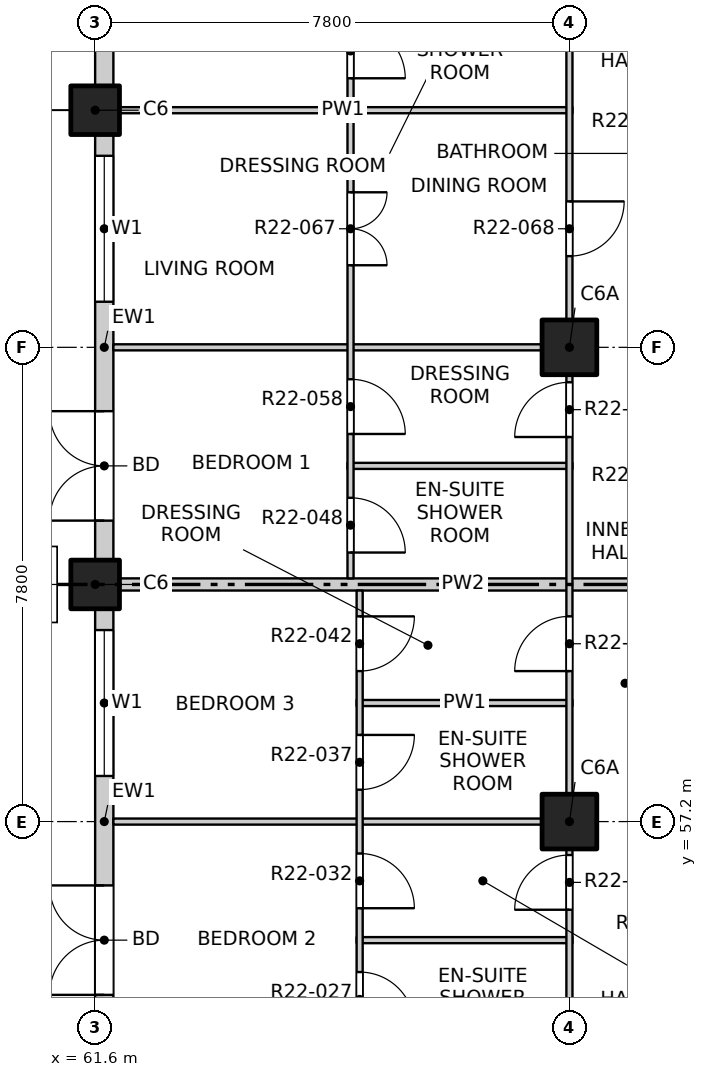
"""IFC4 building model, lengths in metres.
Left out: names, types, materials, properties, quantities, classifications, styles, units other than length and angle.
Written with IfcOpenShell. Run it as: python <this file> out.ifc"""

import sys

from ifc_helpers import new_model, si_unit, direction, frame, frame_2d, origin, origin_2d, place, context, subcontext, project, spatial, rectangle, extrude, element, fill, save


model = new_model("IFC4")
c1 = context("Model", 3, precision=1e-05, world=origin(), true_north=direction((0.0, 1.0)))
c2 = subcontext(c1, "Body", "Model", "MODEL_VIEW")
j1 = project(units=[si_unit("LENGTHUNIT", "METRE"), si_unit("PLANEANGLEUNIT", "RADIAN")], contexts=[c1])
p1 = place(None, origin())
s1 = spatial("IfcSite", under=j1, at=p1, CompositionType="ELEMENT")
p2 = place(p1, origin())
s2 = spatial("IfcBuilding", under=s1, at=p2, CompositionType="ELEMENT")
p3 = place(p2, frame((0.0, 0.0, 231.3)))
s3 = spatial("IfcBuildingStorey", under=s2, at=p3, CompositionType="ELEMENT", Elevation=231.3)
for number, where, z_axis, x_axis in (
    (1, (61.6, 61.1, -0.25), (0.0, 0.0, 1.0), (1.0, 0.0, 0.0)),
    (2, (61.6, 68.9, -0.25), (0.0, 0.0, 1.0), (1.0, 0.0, 0.0)),
):
    element("IfcColumn", number, at=place(p3, frame(where, z_axis=z_axis, x_axis=x_axis)), inside=s3, PredefinedType="COLUMN", context=c2, shape_type="SweptSolid", body=[
        extrude(rectangle(XDim=0.8, YDim=0.8, at=origin_2d()), origin(), (0.0, 0.0, 1.0), 3.4),
    ])
for number, where, z_axis, x_axis in (
    (3, (69.4, 57.2, -0.25), (0.0, 0.0, 1.0), (1.0, 0.0, 0.0)),
    (4, (69.4, 65.0, -0.25), (0.0, 0.0, 1.0), (1.0, 0.0, 0.0)),
):
    element("IfcColumn", number, at=place(p3, frame(where, z_axis=z_axis, x_axis=x_axis)), inside=s3, PredefinedType="COLUMN", context=c2, shape_type="SweptSolid", body=[
        extrude(rectangle(XDim=0.9, YDim=0.9, at=origin_2d()), origin(), (0.0, 0.0, 1.0), 3.4),
    ])
p4 = place(p3, frame((61.75, 53.7, 0.0), z_axis=(0.0, 0.0, 1.0), x_axis=(0.0, 1.0, 0.0)))
e5 = element("IfcWall", 5, at=p4, inside=s3, PredefinedType="SOLIDWALL", context=c2, shape_type="SweptSolid", body=[
    extrude(rectangle(XDim=7.0, YDim=0.3, at=frame_2d((3.5, 0.0))), origin(), (0.0, 0.0, 1.0), 2.7),
])
p5 = place(p4, frame((0.65, 0.0, 0.0)))
e6 = element("IfcOpeningElement", 6, at=p5, cuts=e5, PredefinedType="OPENING", context=c2, shape_type="SweptSolid", body=[
    extrude(rectangle(XDim=1.8, YDim=2.4, at=frame_2d((0.9, 1.2))), frame((0.0, 0.16, 0.0), z_axis=(0.0, -1.0, 0.0), x_axis=(1.0, 0.0, 0.0)), (0.0, 0.0, 1.0), 0.32),
])
p6 = place(p4, frame((4.25, 0.0, 0.9)))
e7 = element("IfcOpeningElement", 7, at=p6, cuts=e5, PredefinedType="OPENING", context=c2, shape_type="SweptSolid", body=[
    extrude(rectangle(XDim=2.4, YDim=1.8, at=frame_2d((1.2, 0.9))), frame((0.0, 0.16, 0.0), z_axis=(0.0, -1.0, 0.0), x_axis=(1.0, 0.0, 0.0)), (0.0, 0.0, 1.0), 0.32),
])
p7 = place(p3, frame((61.75, 61.5, 0.0), z_axis=(0.0, 0.0, 1.0), x_axis=(0.0, 1.0, 0.0)))
e8 = element("IfcWall", 8, at=p7, inside=s3, PredefinedType="SOLIDWALL", context=c2, shape_type="SweptSolid", body=[
    extrude(rectangle(XDim=7.0, YDim=0.3, at=frame_2d((3.5, 0.0))), origin(), (0.0, 0.0, 1.0), 2.7),
])
p8 = place(p7, frame((0.65, 0.0, 0.0)))
e9 = element("IfcOpeningElement", 9, at=p8, cuts=e8, PredefinedType="OPENING", context=c2, shape_type="SweptSolid", body=[
    extrude(rectangle(XDim=1.8, YDim=2.4, at=frame_2d((0.9, 1.2))), frame((0.0, 0.16, 0.0), z_axis=(0.0, -1.0, 0.0), x_axis=(1.0, 0.0, 0.0)), (0.0, 0.0, 1.0), 0.32),
])
p9 = place(p7, frame((4.25, 0.0, 0.9)))
e10 = element("IfcOpeningElement", 10, at=p9, cuts=e8, PredefinedType="OPENING", context=c2, shape_type="SweptSolid", body=[
    extrude(rectangle(XDim=2.4, YDim=1.8, at=frame_2d((1.2, 0.9))), frame((0.0, 0.16, 0.0), z_axis=(0.0, -1.0, 0.0), x_axis=(1.0, 0.0, 0.0)), (0.0, 0.0, 1.0), 0.32),
])
p10 = place(p3, frame((61.75, 69.3, 0.0), z_axis=(0.0, 0.0, 1.0), x_axis=(0.0, 1.0, 0.0)))
e11 = element("IfcWall", 11, at=p10, inside=s3, PredefinedType="SOLIDWALL", context=c2, shape_type="SweptSolid", body=[
    extrude(rectangle(XDim=7.0, YDim=0.3, at=frame_2d((3.5, 0.0))), origin(), (0.0, 0.0, 1.0), 2.7),
])
p11 = place(p10, frame((0.65, 0.0, 0.0)))
e12 = element("IfcOpeningElement", 12, at=p11, cuts=e11, PredefinedType="OPENING", context=c2, shape_type="SweptSolid", body=[
    extrude(rectangle(XDim=1.8, YDim=2.4, at=frame_2d((0.9, 1.2))), frame((0.0, 0.16, 0.0), z_axis=(0.0, -1.0, 0.0), x_axis=(1.0, 0.0, 0.0)), (0.0, 0.0, 1.0), 0.32),
])
p12 = place(p10, frame((4.25, 0.0, 0.9)))
e13 = element("IfcOpeningElement", 13, at=p12, cuts=e11, PredefinedType="OPENING", context=c2, shape_type="SweptSolid", body=[
    extrude(rectangle(XDim=2.4, YDim=1.8, at=frame_2d((1.2, 0.9))), frame((0.0, 0.16, 0.0), z_axis=(0.0, -1.0, 0.0), x_axis=(1.0, 0.0, 0.0)), (0.0, 0.0, 1.0), 0.32),
])
p13 = place(p3, frame((65.9, 55.25, 0.0), z_axis=(0.0, 0.0, 1.0), x_axis=(1.0, 0.0, 0.0)))
e14 = element("IfcWall", 14, at=p13, inside=s3, PredefinedType="PARTITIONING", context=c2, shape_type="SweptSolid", body=[
    extrude(rectangle(XDim=3.55, YDim=0.1, at=frame_2d((1.775, 0.0))), origin(), (0.0, 0.0, 1.0), 3.15),
])
p14 = place(p3, frame((61.9, 57.2, 0.0), z_axis=(0.0, 0.0, 1.0), x_axis=(1.0, 0.0, 0.0)))
e15 = element("IfcWall", 15, at=p14, inside=s3, PredefinedType="PARTITIONING", context=c2, shape_type="SweptSolid", body=[
    extrude(rectangle(XDim=7.55, YDim=0.1, at=frame_2d((3.775, 0.0))), origin(), (0.0, 0.0, 1.0), 3.15),
])
p15 = place(p3, frame((65.9, 59.15, 0.0), z_axis=(0.0, 0.0, 1.0), x_axis=(1.0, 0.0, 0.0)))
e16 = element("IfcWall", 16, at=p15, inside=s3, PredefinedType="PARTITIONING", context=c2, shape_type="SweptSolid", body=[
    extrude(rectangle(XDim=3.55, YDim=0.1, at=frame_2d((1.775, 0.0))), origin(), (0.0, 0.0, 1.0), 3.15),
])
p16 = place(p3, frame((61.9, 61.1, 0.0), z_axis=(0.0, 0.0, 1.0), x_axis=(1.0, 0.0, 0.0)))
e17 = element("IfcWall", 17, at=p16, inside=s3, PredefinedType="PARTITIONING", context=c2, shape_type="SweptSolid", body=[
    extrude(rectangle(XDim=11.5, YDim=0.2, at=frame_2d((5.75, 0.0))), origin(), (0.0, 0.0, 1.0), 2.55),
])
p17 = place(p3, frame((65.75, 63.05, 0.0), z_axis=(0.0, 0.0, 1.0), x_axis=(1.0, 0.0, 0.0)))
e18 = element("IfcWall", 18, at=p17, inside=s3, PredefinedType="PARTITIONING", context=c2, shape_type="SweptSolid", body=[
    extrude(rectangle(XDim=3.7, YDim=0.1, at=frame_2d((1.85, 0.0))), origin(), (0.0, 0.0, 1.0), 3.15),
])
p18 = place(p3, frame((61.9, 65.0, 0.0), z_axis=(0.0, 0.0, 1.0), x_axis=(1.0, 0.0, 0.0)))
e19 = element("IfcWall", 19, at=p18, inside=s3, PredefinedType="PARTITIONING", context=c2, shape_type="SweptSolid", body=[
    extrude(rectangle(XDim=7.55, YDim=0.1, at=frame_2d((3.775, 0.0))), origin(), (0.0, 0.0, 1.0), 3.15),
])
p19 = place(p3, frame((61.9, 68.9, 0.0), z_axis=(0.0, 0.0, 1.0), x_axis=(1.0, 0.0, 0.0)))
e20 = element("IfcWall", 20, at=p19, inside=s3, PredefinedType="PARTITIONING", context=c2, shape_type="SweptSolid", body=[
    extrude(rectangle(XDim=7.55, YDim=0.1, at=frame_2d((3.775, 0.0))), origin(), (0.0, 0.0, 1.0), 2.55),
])
p20 = place(p3, frame((65.8, 61.2, 0.0), z_axis=(0.0, 0.0, 1.0), x_axis=(0.0, 1.0, 0.0)))
e21 = element("IfcWall", 21, at=p20, inside=s3, PredefinedType="PARTITIONING", context=c2, shape_type="SweptSolid", body=[
    extrude(rectangle(XDim=11.5, YDim=0.1, at=frame_2d((5.75, 0.0))), origin(), (0.0, 0.0, 1.0), 3.15),
])
p21 = place(p20, frame((0.425, 0.0, 0.0)))
e22 = element("IfcOpeningElement", 22, at=p21, cuts=e21, PredefinedType="OPENING", context=c2, shape_type="SweptSolid", body=[
    extrude(rectangle(XDim=0.9, YDim=2.1, at=frame_2d((0.45, 1.05))), frame((0.0, 0.06, 0.0), z_axis=(0.0, -1.0, 0.0), x_axis=(1.0, 0.0, 0.0)), (0.0, 0.0, 1.0), 0.12),
])
p22 = place(p20, frame((2.375, 0.0, 0.0)))
e23 = element("IfcOpeningElement", 23, at=p22, cuts=e21, PredefinedType="OPENING", context=c2, shape_type="SweptSolid", body=[
    extrude(rectangle(XDim=0.9, YDim=2.1, at=frame_2d((0.45, 1.05))), frame((0.0, 0.06, 0.0), z_axis=(0.0, -1.0, 0.0), x_axis=(1.0, 0.0, 0.0)), (0.0, 0.0, 1.0), 0.12),
])
p23 = place(p20, frame((5.15, 0.0, 0.0)))
e24 = element("IfcOpeningElement", 24, at=p23, cuts=e21, PredefinedType="OPENING", context=c2, shape_type="SweptSolid", body=[
    extrude(rectangle(XDim=1.2, YDim=2.1, at=frame_2d((0.6, 1.05))), frame((0.0, 0.06, 0.0), z_axis=(0.0, -1.0, 0.0), x_axis=(1.0, 0.0, 0.0)), (0.0, 0.0, 1.0), 0.12),
])
p24 = place(p20, frame((8.225, 0.0, 0.0)))
e25 = element("IfcOpeningElement", 25, at=p24, cuts=e21, PredefinedType="OPENING", context=c2, shape_type="SweptSolid", body=[
    extrude(rectangle(XDim=0.9, YDim=2.1, at=frame_2d((0.45, 1.05))), frame((0.0, 0.06, 0.0), z_axis=(0.0, -1.0, 0.0), x_axis=(1.0, 0.0, 0.0)), (0.0, 0.0, 1.0), 0.12),
])
p25 = place(p20, frame((10.175, 0.0, 0.0)))
e26 = element("IfcOpeningElement", 26, at=p25, cuts=e21, PredefinedType="OPENING", context=c2, shape_type="SweptSolid", body=[
    extrude(rectangle(XDim=0.9, YDim=2.1, at=frame_2d((0.45, 1.05))), frame((0.0, 0.06, 0.0), z_axis=(0.0, -1.0, 0.0), x_axis=(1.0, 0.0, 0.0)), (0.0, 0.0, 1.0), 0.12),
])
p26 = place(p3, frame((65.95, 41.9, 0.0), z_axis=(0.0, 0.0, 1.0), x_axis=(0.0, 1.0, 0.0)))
e27 = element("IfcWall", 27, at=p26, inside=s3, PredefinedType="PARTITIONING", context=c2, shape_type="SweptSolid", body=[
    extrude(rectangle(XDim=19.1, YDim=0.1, at=frame_2d((9.55, 0.0))), origin(), (0.0, 0.0, 1.0), 3.15),
])
p27 = place(p26, frame((1.05, 0.0, 0.0)))
e28 = element("IfcOpeningElement", 28, at=p27, cuts=e27, PredefinedType="OPENING", context=c2, shape_type="SweptSolid", body=[
    extrude(rectangle(XDim=1.2, YDim=2.1, at=frame_2d((0.6, 1.05))), frame((0.0, 0.06, 0.0), z_axis=(0.0, -1.0, 0.0), x_axis=(1.0, 0.0, 0.0)), (0.0, 0.0, 1.0), 0.12),
])
p28 = place(p26, frame((4.95, 0.0, 0.0)))
e29 = element("IfcOpeningElement", 29, at=p28, cuts=e27, PredefinedType="OPENING", context=c2, shape_type="SweptSolid", body=[
    extrude(rectangle(XDim=1.2, YDim=2.1, at=frame_2d((0.6, 1.05))), frame((0.0, 0.06, 0.0), z_axis=(0.0, -1.0, 0.0), x_axis=(1.0, 0.0, 0.0)), (0.0, 0.0, 1.0), 0.12),
])
p29 = place(p26, frame((8.85, 0.0, 0.0)))
e30 = element("IfcOpeningElement", 30, at=p29, cuts=e27, PredefinedType="OPENING", context=c2, shape_type="SweptSolid", body=[
    extrude(rectangle(XDim=1.2, YDim=2.1, at=frame_2d((0.6, 1.05))), frame((0.0, 0.06, 0.0), z_axis=(0.0, -1.0, 0.0), x_axis=(1.0, 0.0, 0.0)), (0.0, 0.0, 1.0), 0.12),
])
p30 = place(p26, frame((11.925, 0.0, 0.0)))
e31 = element("IfcOpeningElement", 31, at=p30, cuts=e27, PredefinedType="OPENING", context=c2, shape_type="SweptSolid", body=[
    extrude(rectangle(XDim=0.9, YDim=2.1, at=frame_2d((0.45, 1.05))), frame((0.0, 0.06, 0.0), z_axis=(0.0, -1.0, 0.0), x_axis=(1.0, 0.0, 0.0)), (0.0, 0.0, 1.0), 0.12),
])
p31 = place(p26, frame((13.875, 0.0, 0.0)))
e32 = element("IfcOpeningElement", 32, at=p31, cuts=e27, PredefinedType="OPENING", context=c2, shape_type="SweptSolid", body=[
    extrude(rectangle(XDim=0.9, YDim=2.1, at=frame_2d((0.45, 1.05))), frame((0.0, 0.06, 0.0), z_axis=(0.0, -1.0, 0.0), x_axis=(1.0, 0.0, 0.0)), (0.0, 0.0, 1.0), 0.12),
])
p32 = place(p26, frame((15.825, 0.0, 0.0)))
e33 = element("IfcOpeningElement", 33, at=p32, cuts=e27, PredefinedType="OPENING", context=c2, shape_type="SweptSolid", body=[
    extrude(rectangle(XDim=0.9, YDim=2.1, at=frame_2d((0.45, 1.05))), frame((0.0, 0.06, 0.0), z_axis=(0.0, -1.0, 0.0), x_axis=(1.0, 0.0, 0.0)), (0.0, 0.0, 1.0), 0.12),
])
p33 = place(p26, frame((17.775, 0.0, 0.0)))
e34 = element("IfcOpeningElement", 34, at=p33, cuts=e27, PredefinedType="OPENING", context=c2, shape_type="SweptSolid", body=[
    extrude(rectangle(XDim=0.9, YDim=2.1, at=frame_2d((0.45, 1.05))), frame((0.0, 0.06, 0.0), z_axis=(0.0, -1.0, 0.0), x_axis=(1.0, 0.0, 0.0)), (0.0, 0.0, 1.0), 0.12),
])
p34 = place(p3, frame((69.4, 41.9, 0.0), z_axis=(0.0, 0.0, 1.0), x_axis=(0.0, 1.0, 0.0)))
e35 = element("IfcWall", 35, at=p34, inside=s3, PredefinedType="PARTITIONING", context=c2, shape_type="SweptSolid", body=[
    extrude(rectangle(XDim=46.2, YDim=0.1, at=frame_2d((23.1, 0.0))), origin(), (0.0, 0.0, 1.0), 3.15),
])
p35 = place(p34, frame((1.2, 0.0, 0.0)))
e36 = element("IfcOpeningElement", 36, at=p35, cuts=e35, PredefinedType="OPENING", context=c2, shape_type="SweptSolid", body=[
    extrude(rectangle(XDim=0.9, YDim=2.1, at=frame_2d((0.45, 1.05))), frame((0.0, 0.06, 0.0), z_axis=(0.0, -1.0, 0.0), x_axis=(1.0, 0.0, 0.0)), (0.0, 0.0, 1.0), 0.12),
])
p36 = place(p34, frame((5.1, 0.0, 0.0)))
e37 = element("IfcOpeningElement", 37, at=p36, cuts=e35, PredefinedType="OPENING", context=c2, shape_type="SweptSolid", body=[
    extrude(rectangle(XDim=0.9, YDim=2.1, at=frame_2d((0.45, 1.05))), frame((0.0, 0.06, 0.0), z_axis=(0.0, -1.0, 0.0), x_axis=(1.0, 0.0, 0.0)), (0.0, 0.0, 1.0), 0.12),
])
p37 = place(p34, frame((9.0, 0.0, 0.0)))
e38 = element("IfcOpeningElement", 38, at=p37, cuts=e35, PredefinedType="OPENING", context=c2, shape_type="SweptSolid", body=[
    extrude(rectangle(XDim=0.9, YDim=2.1, at=frame_2d((0.45, 1.05))), frame((0.0, 0.06, 0.0), z_axis=(0.0, -1.0, 0.0), x_axis=(1.0, 0.0, 0.0)), (0.0, 0.0, 1.0), 0.12),
])
p38 = place(p34, frame((13.85, 0.0, 0.0)))
e39 = element("IfcOpeningElement", 39, at=p38, cuts=e35, PredefinedType="OPENING", context=c2, shape_type="SweptSolid", body=[
    extrude(rectangle(XDim=0.9, YDim=2.1, at=frame_2d((0.45, 1.05))), frame((0.0, 0.06, 0.0), z_axis=(0.0, -1.0, 0.0), x_axis=(1.0, 0.0, 0.0)), (0.0, 0.0, 1.0), 0.12),
])
p39 = place(p34, frame((17.775, 0.0, 0.0)))
e40 = element("IfcOpeningElement", 40, at=p39, cuts=e35, PredefinedType="OPENING", context=c2, shape_type="SweptSolid", body=[
    extrude(rectangle(XDim=0.9, YDim=2.1, at=frame_2d((0.45, 1.05))), frame((0.0, 0.06, 0.0), z_axis=(0.0, -1.0, 0.0), x_axis=(1.0, 0.0, 0.0)), (0.0, 0.0, 1.0), 0.12),
])
p40 = place(p34, frame((21.625, 0.0, 0.0)))
e41 = element("IfcOpeningElement", 41, at=p40, cuts=e35, PredefinedType="OPENING", context=c2, shape_type="SweptSolid", body=[
    extrude(rectangle(XDim=0.9, YDim=2.1, at=frame_2d((0.45, 1.05))), frame((0.0, 0.06, 0.0), z_axis=(0.0, -1.0, 0.0), x_axis=(1.0, 0.0, 0.0)), (0.0, 0.0, 1.0), 0.12),
])
p41 = place(p34, frame((24.6, 0.0, 0.0)))
e42 = element("IfcOpeningElement", 42, at=p41, cuts=e35, PredefinedType="OPENING", context=c2, shape_type="SweptSolid", body=[
    extrude(rectangle(XDim=0.9, YDim=2.1, at=frame_2d((0.45, 1.05))), frame((0.0, 0.06, 0.0), z_axis=(0.0, -1.0, 0.0), x_axis=(1.0, 0.0, 0.0)), (0.0, 0.0, 1.0), 0.12),
])
p42 = place(p34, frame((29.425, 0.0, 0.0)))
e43 = element("IfcOpeningElement", 43, at=p42, cuts=e35, PredefinedType="OPENING", context=c2, shape_type="SweptSolid", body=[
    extrude(rectangle(XDim=0.9, YDim=2.1, at=frame_2d((0.45, 1.05))), frame((0.0, 0.06, 0.0), z_axis=(0.0, -1.0, 0.0), x_axis=(1.0, 0.0, 0.0)), (0.0, 0.0, 1.0), 0.12),
])
p43 = place(p34, frame((33.375, 0.0, 0.0)))
e44 = element("IfcOpeningElement", 44, at=p43, cuts=e35, PredefinedType="OPENING", context=c2, shape_type="SweptSolid", body=[
    extrude(rectangle(XDim=0.9, YDim=2.1, at=frame_2d((0.45, 1.05))), frame((0.0, 0.06, 0.0), z_axis=(0.0, -1.0, 0.0), x_axis=(1.0, 0.0, 0.0)), (0.0, 0.0, 1.0), 0.12),
])
p44 = place(p34, frame((36.3, 0.0, 0.0)))
e45 = element("IfcOpeningElement", 45, at=p44, cuts=e35, PredefinedType="OPENING", context=c2, shape_type="SweptSolid", body=[
    extrude(rectangle(XDim=0.9, YDim=2.1, at=frame_2d((0.45, 1.05))), frame((0.0, 0.06, 0.0), z_axis=(0.0, -1.0, 0.0), x_axis=(1.0, 0.0, 0.0)), (0.0, 0.0, 1.0), 0.12),
])
p45 = place(p34, frame((41.175, 0.0, 0.0)))
e46 = element("IfcOpeningElement", 46, at=p45, cuts=e35, PredefinedType="OPENING", context=c2, shape_type="SweptSolid", body=[
    extrude(rectangle(XDim=0.9, YDim=2.1, at=frame_2d((0.45, 1.05))), frame((0.0, 0.06, 0.0), z_axis=(0.0, -1.0, 0.0), x_axis=(1.0, 0.0, 0.0)), (0.0, 0.0, 1.0), 0.12),
])
p46 = place(p34, frame((44.1, 0.0, 0.0)))
e47 = element("IfcOpeningElement", 47, at=p46, cuts=e35, PredefinedType="OPENING", context=c2, shape_type="SweptSolid", body=[
    extrude(rectangle(XDim=0.9, YDim=2.1, at=frame_2d((0.45, 1.05))), frame((0.0, 0.06, 0.0), z_axis=(0.0, -1.0, 0.0), x_axis=(1.0, 0.0, 0.0)), (0.0, 0.0, 1.0), 0.12),
])
p47 = place(p5, origin())
e48 = element("IfcDoor", 48, at=p47, inside=s3, OperationType="DOUBLE_DOOR_SINGLE_SWING", PredefinedType="DOOR", context=c2, shape_type="SweptSolid", body=[
    extrude(rectangle(XDim=1.8, YDim=2.4, at=frame_2d((0.9, 1.2))), frame((0.0, 0.025, 0.0), z_axis=(0.0, -1.0, 0.0), x_axis=(1.0, 0.0, 0.0)), (0.0, 0.0, 1.0), 0.05),
])
fill(e6, e48)
p48 = place(p6, origin())
e49 = element("IfcWindow", 49, at=p48, inside=s3, PartitioningType="DOUBLE_PANEL_VERTICAL", PredefinedType="WINDOW", context=c2, shape_type="SweptSolid", body=[
    extrude(rectangle(XDim=2.4, YDim=1.8, at=frame_2d((1.2, 0.9))), frame((0.0, 0.03, 0.0), z_axis=(0.0, -1.0, 0.0), x_axis=(1.0, 0.0, 0.0)), (0.0, 0.0, 1.0), 0.06),
])
fill(e7, e49)
p49 = place(p8, origin())
e50 = element("IfcDoor", 50, at=p49, inside=s3, OperationType="DOUBLE_DOOR_SINGLE_SWING", PredefinedType="DOOR", context=c2, shape_type="SweptSolid", body=[
    extrude(rectangle(XDim=1.8, YDim=2.4, at=frame_2d((0.9, 1.2))), frame((0.0, 0.025, 0.0), z_axis=(0.0, -1.0, 0.0), x_axis=(1.0, 0.0, 0.0)), (0.0, 0.0, 1.0), 0.05),
])
fill(e9, e50)
p50 = place(p9, origin())
e51 = element("IfcWindow", 51, at=p50, inside=s3, PartitioningType="DOUBLE_PANEL_VERTICAL", PredefinedType="WINDOW", context=c2, shape_type="SweptSolid", body=[
    extrude(rectangle(XDim=2.4, YDim=1.8, at=frame_2d((1.2, 0.9))), frame((0.0, 0.03, 0.0), z_axis=(0.0, -1.0, 0.0), x_axis=(1.0, 0.0, 0.0)), (0.0, 0.0, 1.0), 0.06),
])
fill(e10, e51)
p51 = place(p30, origin())
e52 = element("IfcDoor", 52, at=p51, inside=s3, OperationType="SINGLE_SWING_RIGHT", PredefinedType="DOOR", context=c2, shape_type="SweptSolid", body=[
    extrude(rectangle(XDim=0.9, YDim=2.1, at=frame_2d((0.45, 1.05))), frame((0.0, 0.025, 0.0), z_axis=(0.0, -1.0, 0.0), x_axis=(1.0, 0.0, 0.0)), (0.0, 0.0, 1.0), 0.05),
])
fill(e31, e52)
p52 = place(p38, origin())
e53 = element("IfcDoor", 53, at=p52, inside=s3, OperationType="SINGLE_SWING_LEFT", PredefinedType="DOOR", context=c2, shape_type="SweptSolid", body=[
    extrude(rectangle(XDim=0.9, YDim=2.1, at=frame_2d((0.45, 1.05))), frame((0.0, 0.025, 0.0), z_axis=(0.0, -1.0, 0.0), x_axis=(1.0, 0.0, 0.0)), (0.0, 0.0, 1.0), 0.05),
])
fill(e39, e53)
p53 = place(p31, origin())
e54 = element("IfcDoor", 54, at=p53, inside=s3, OperationType="SINGLE_SWING_RIGHT", PredefinedType="DOOR", context=c2, shape_type="SweptSolid", body=[
    extrude(rectangle(XDim=0.9, YDim=2.1, at=frame_2d((0.45, 1.05))), frame((0.0, 0.025, 0.0), z_axis=(0.0, -1.0, 0.0), x_axis=(1.0, 0.0, 0.0)), (0.0, 0.0, 1.0), 0.05),
])
fill(e32, e54)
p54 = place(p32, origin())
e55 = element("IfcDoor", 55, at=p54, inside=s3, OperationType="SINGLE_SWING_LEFT", PredefinedType="DOOR", context=c2, shape_type="SweptSolid", body=[
    extrude(rectangle(XDim=0.9, YDim=2.1, at=frame_2d((0.45, 1.05))), frame((0.0, 0.025, 0.0), z_axis=(0.0, -1.0, 0.0), x_axis=(1.0, 0.0, 0.0)), (0.0, 0.0, 1.0), 0.05),
])
fill(e33, e55)
p55 = place(p33, origin())
e56 = element("IfcDoor", 56, at=p55, inside=s3, OperationType="SINGLE_SWING_LEFT", PredefinedType="DOOR", context=c2, shape_type="SweptSolid", body=[
    extrude(rectangle(XDim=0.9, YDim=2.1, at=frame_2d((0.45, 1.05))), frame((0.0, 0.025, 0.0), z_axis=(0.0, -1.0, 0.0), x_axis=(1.0, 0.0, 0.0)), (0.0, 0.0, 1.0), 0.05),
])
fill(e34, e56)
p56 = place(p39, origin())
e57 = element("IfcDoor", 57, at=p56, inside=s3, OperationType="SINGLE_SWING_LEFT", PredefinedType="DOOR", context=c2, shape_type="SweptSolid", body=[
    extrude(rectangle(XDim=0.9, YDim=2.1, at=frame_2d((0.45, 1.05))), frame((0.0, 0.025, 0.0), z_axis=(0.0, -1.0, 0.0), x_axis=(1.0, 0.0, 0.0)), (0.0, 0.0, 1.0), 0.05),
])
fill(e40, e57)
p57 = place(p21, origin())
e58 = element("IfcDoor", 58, at=p57, inside=s3, OperationType="SINGLE_SWING_RIGHT", PredefinedType="DOOR", context=c2, shape_type="SweptSolid", body=[
    extrude(rectangle(XDim=0.9, YDim=2.1, at=frame_2d((0.45, 1.05))), frame((0.0, 0.025, 0.0), z_axis=(0.0, -1.0, 0.0), x_axis=(1.0, 0.0, 0.0)), (0.0, 0.0, 1.0), 0.05),
])
fill(e22, e58)
p58 = place(p40, origin())
e59 = element("IfcDoor", 59, at=p58, inside=s3, OperationType="SINGLE_SWING_LEFT", PredefinedType="DOOR", context=c2, shape_type="SweptSolid", body=[
    extrude(rectangle(XDim=0.9, YDim=2.1, at=frame_2d((0.45, 1.05))), frame((0.0, 0.025, 0.0), z_axis=(0.0, -1.0, 0.0), x_axis=(1.0, 0.0, 0.0)), (0.0, 0.0, 1.0), 0.05),
])
fill(e41, e59)
p59 = place(p22, origin())
e60 = element("IfcDoor", 60, at=p59, inside=s3, OperationType="SINGLE_SWING_RIGHT", PredefinedType="DOOR", context=c2, shape_type="SweptSolid", body=[
    extrude(rectangle(XDim=0.9, YDim=2.1, at=frame_2d((0.45, 1.05))), frame((0.0, 0.025, 0.0), z_axis=(0.0, -1.0, 0.0), x_axis=(1.0, 0.0, 0.0)), (0.0, 0.0, 1.0), 0.05),
])
fill(e23, e60)
p60 = place(p23, origin())
e61 = element("IfcDoor", 61, at=p60, inside=s3, OperationType="DOUBLE_DOOR_SINGLE_SWING", PredefinedType="DOOR", context=c2, shape_type="SweptSolid", body=[
    extrude(rectangle(XDim=1.2, YDim=2.1, at=frame_2d((0.6, 1.05))), frame((0.0, 0.025, 0.0), z_axis=(0.0, -1.0, 0.0), x_axis=(1.0, 0.0, 0.0)), (0.0, 0.0, 1.0), 0.05),
])
fill(e24, e61)
p61 = place(p41, origin())
e62 = element("IfcDoor", 62, at=p61, inside=s3, OperationType="SINGLE_SWING_LEFT", PredefinedType="DOOR", context=c2, shape_type="SweptSolid", body=[
    extrude(rectangle(XDim=0.9, YDim=2.1, at=frame_2d((0.45, 1.05))), frame((0.0, 0.025, 0.0), z_axis=(0.0, -1.0, 0.0), x_axis=(1.0, 0.0, 0.0)), (0.0, 0.0, 1.0), 0.05),
])
fill(e42, e62)
p62 = place(p24, origin())
e63 = element("IfcDoor", 63, at=p62, inside=s3, OperationType="SINGLE_SWING_RIGHT", PredefinedType="DOOR", context=c2, shape_type="SweptSolid", body=[
    extrude(rectangle(XDim=0.9, YDim=2.1, at=frame_2d((0.45, 1.05))), frame((0.0, 0.025, 0.0), z_axis=(0.0, -1.0, 0.0), x_axis=(1.0, 0.0, 0.0)), (0.0, 0.0, 1.0), 0.05),
])
fill(e25, e63)
save(model, sys.argv[1])
